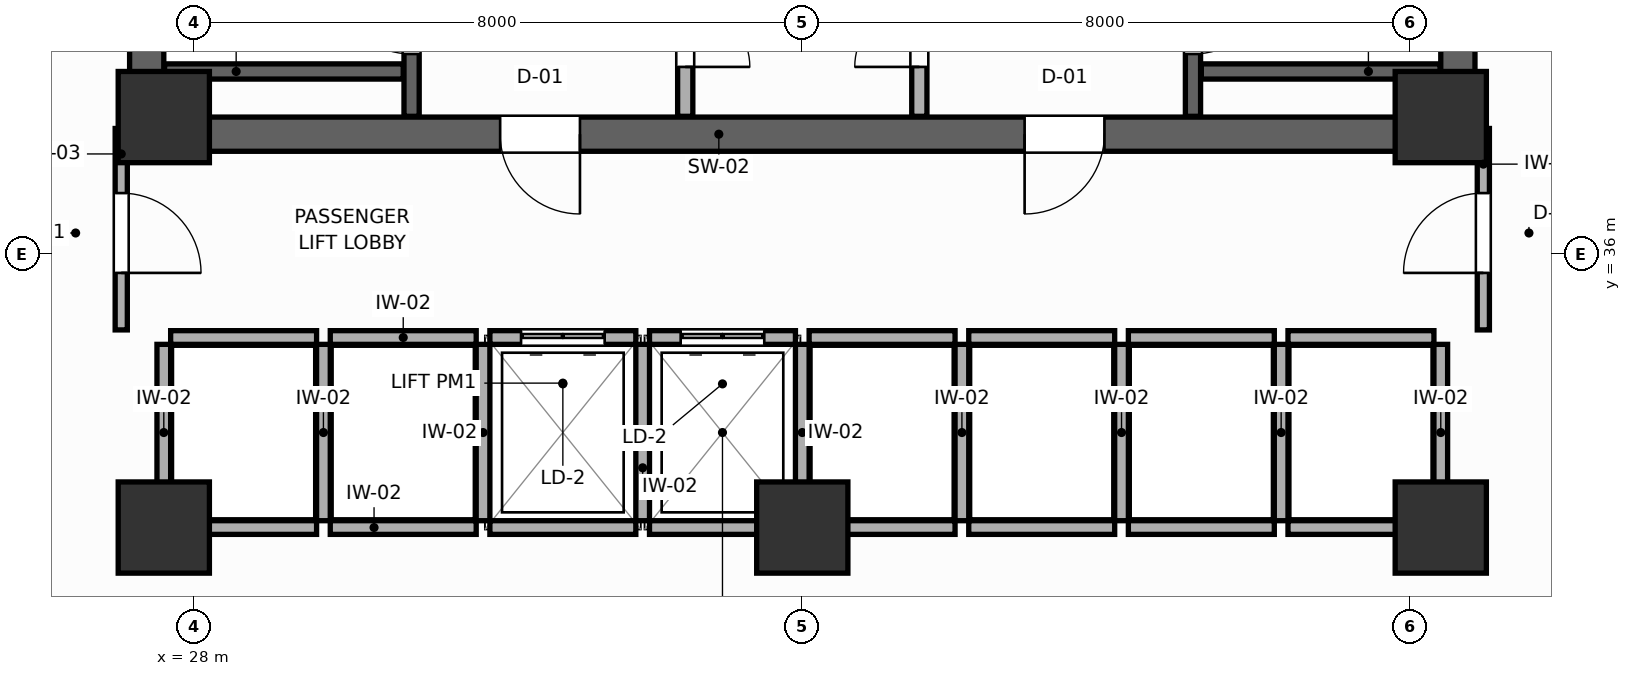
"""IFC4 building model, lengths in metres.
Left out: names, types, materials, properties, quantities, classifications, styles, units other than length and angle.
Written with IfcOpenShell. Run it as: python <this file> out.ifc"""

import sys

from ifc_helpers import new_model, si_unit, direction, frame, frame_2d, origin, origin_2d, place, context, subcontext, project, spatial, rectangle, extrude, source, transform, mapped, element, fill, save


model = new_model("IFC4")
c1 = context("Model", 3, precision=1e-05, world=origin(), true_north=direction((0.0, 1.0)))
c2 = subcontext(c1, "Body", "Model", "MODEL_VIEW")
j1 = project(units=[si_unit("LENGTHUNIT", "METRE"), si_unit("PLANEANGLEUNIT", "RADIAN")], contexts=[c1])
p1 = place(None, origin())
s1 = spatial("IfcSite", under=j1, at=p1, CompositionType="ELEMENT")
p2 = place(p1, origin())
s2 = spatial("IfcBuilding", under=s1, at=p2, CompositionType="ELEMENT")
p3 = place(p2, frame((0.0, 0.0, 102.6)))
s3 = spatial("IfcBuildingStorey", under=s2, at=p3, CompositionType="ELEMENT", Elevation=102.6)
p4 = place(p3, frame((27.15, 37.575, 0.0), z_axis=(0.0, 0.0, 1.0), x_axis=(1.0, 0.0, 0.0)))
e1 = element("IfcWall", 1, at=p4, inside=s3, PredefinedType="SHEAR", context=c2, shape_type="SweptSolid", body=[
    extrude(rectangle(XDim=17.7, YDim=0.45, at=frame_2d((8.85, 0.0))), origin(), (0.0, 0.0, 1.0), 3.6),
])
p5 = place(p4, frame((4.875, 0.0, 0.0)))
e2 = element("IfcOpeningElement", 2, at=p5, cuts=e1, PredefinedType="OPENING", context=c2, shape_type="SweptSolid", body=[
    extrude(rectangle(XDim=1.05, YDim=2.1, at=frame_2d((0.525, 1.05))), frame((0.0, 0.235, 0.0), z_axis=(0.0, -1.0, 0.0), x_axis=(1.0, 0.0, 0.0)), (0.0, 0.0, 1.0), 0.47),
])
p6 = place(p4, frame((11.775, 0.0, 0.0)))
e3 = element("IfcOpeningElement", 3, at=p6, cuts=e1, PredefinedType="OPENING", context=c2, shape_type="SweptSolid", body=[
    extrude(rectangle(XDim=1.05, YDim=2.1, at=frame_2d((0.525, 1.05))), frame((0.0, 0.235, 0.0), z_axis=(0.0, -1.0, 0.0), x_axis=(1.0, 0.0, 0.0)), (0.0, 0.0, 1.0), 0.47),
])
for number, where, z_axis, x_axis in (
    (4, (27.375, 37.8, 0.0), (0.0, 0.0, 1.0), (0.0, 1.0, 0.0)),
    (5, (44.625, 37.8, 0.0), (0.0, 0.0, 1.0), (0.0, 1.0, 0.0)),
):
    element("IfcWall", number, at=place(p3, frame(where, z_axis=z_axis, x_axis=x_axis)), inside=s3, PredefinedType="SHEAR", context=c2, shape_type="SweptSolid", body=[
        extrude(rectangle(XDim=9.0, YDim=0.45, at=frame_2d((4.5, 0.0))), origin(), (0.0, 0.0, 1.0), 3.6),
    ])
m1 = source(origin(), c2, "Body", "SweptSolid", [
    extrude(rectangle(XDim=1.2, YDim=1.2, at=origin_2d()), origin(), (0.0, 0.0, 1.0), 3.6),
])
for number, where, z_axis, x_axis in (
    (6, (27.6, 37.8, 0.0), (0.0, 0.0, 1.0), (1.0, 0.0, 0.0)),
    (7, (44.4, 37.8, 0.0), (0.0, 0.0, 1.0), (1.0, 0.0, 0.0)),
    (8, (27.6, 32.4, 0.0), (0.0, 0.0, 1.0), (1.0, 0.0, 0.0)),
    (9, (44.4, 32.4, 0.0), (0.0, 0.0, 1.0), (1.0, 0.0, 0.0)),
    (10, (36.0, 32.4, 0.0), (0.0, 0.0, 1.0), (1.0, 0.0, 0.0)),
):
    element("IfcColumn", number, at=place(p3, frame(where, z_axis=z_axis, x_axis=x_axis)), inside=s3, PredefinedType="COLUMN", context=c2, shape_type="MappedRepresentation", body=[
        mapped(m1, transform((0.0, 0.0, 0.0), scale=1.0)),
    ])
p7 = place(p3, frame((30.86, 37.81, 0.0), z_axis=(0.0, 0.0, 1.0), x_axis=(0.0, 1.0, 0.0)))
e11 = element("IfcWall", 11, at=p7, inside=s3, PredefinedType="SHEAR", context=c2, shape_type="SweptSolid", body=[
    extrude(rectangle(XDim=8.98, YDim=0.2, at=frame_2d((4.49, 0.0))), origin(), (0.0, 0.0, 1.0), 3.6),
])
p8 = place(p7, frame((0.82, 0.0, 0.0)))
e12 = element("IfcOpeningElement", 12, at=p8, cuts=e11, PredefinedType="OPENING", context=c2, shape_type="SweptSolid", body=[
    extrude(rectangle(XDim=1.05, YDim=2.1, at=frame_2d((0.525, 1.05))), frame((0.0, 0.11, 0.0), z_axis=(0.0, -1.0, 0.0), x_axis=(1.0, 0.0, 0.0)), (0.0, 0.0, 1.0), 0.22),
])
p9 = place(p3, frame((27.61, 38.4, 0.0), z_axis=(0.0, 0.0, 1.0), x_axis=(1.0, 0.0, 0.0)))
e13 = element("IfcWall", 13, at=p9, inside=s3, PredefinedType="SHEAR", context=c2, shape_type="SweptSolid", body=[
    extrude(rectangle(XDim=3.14, YDim=0.2, at=frame_2d((1.57, 0.0))), origin(), (0.0, 0.0, 1.0), 3.6),
])
p10 = place(p3, frame((41.14, 37.81, 0.0), z_axis=(0.0, 0.0, 1.0), x_axis=(0.0, 1.0, 0.0)))
e14 = element("IfcWall", 14, at=p10, inside=s3, PredefinedType="SHEAR", context=c2, shape_type="SweptSolid", body=[
    extrude(rectangle(XDim=8.98, YDim=0.2, at=frame_2d((4.49, 0.0))), origin(), (0.0, 0.0, 1.0), 3.6),
])
p11 = place(p10, frame((0.82, 0.0, 0.0)))
e15 = element("IfcOpeningElement", 15, at=p11, cuts=e14, PredefinedType="OPENING", context=c2, shape_type="SweptSolid", body=[
    extrude(rectangle(XDim=1.05, YDim=2.1, at=frame_2d((0.525, 1.05))), frame((0.0, 0.11, 0.0), z_axis=(0.0, -1.0, 0.0), x_axis=(1.0, 0.0, 0.0)), (0.0, 0.0, 1.0), 0.22),
])
p12 = place(p3, frame((41.25, 38.4, 0.0), z_axis=(0.0, 0.0, 1.0), x_axis=(1.0, 0.0, 0.0)))
e16 = element("IfcWall", 16, at=p12, inside=s3, PredefinedType="SHEAR", context=c2, shape_type="SweptSolid", body=[
    extrude(rectangle(XDim=3.14, YDim=0.2, at=frame_2d((1.57, 0.0))), origin(), (0.0, 0.0, 1.0), 3.6),
])
p13 = place(p3, frame((34.46, 37.81, 0.0), z_axis=(0.0, 0.0, 1.0), x_axis=(0.0, 1.0, 0.0)))
e17 = element("IfcWall", 17, at=p13, inside=s3, PredefinedType="PARTITIONING", context=c2, shape_type="SweptSolid", body=[
    extrude(rectangle(XDim=8.98, YDim=0.2, at=frame_2d((4.49, 0.0))), origin(), (0.0, 0.0, 1.0), 3.4),
])
p14 = place(p13, frame((0.65, 0.0, 0.0)))
e18 = element("IfcOpeningElement", 18, at=p14, cuts=e17, PredefinedType="OPENING", context=c2, shape_type="SweptSolid", body=[
    extrude(rectangle(XDim=0.85, YDim=2.05, at=frame_2d((0.425, 1.025))), frame((0.0, 0.11, 0.0), z_axis=(0.0, -1.0, 0.0), x_axis=(1.0, 0.0, 0.0)), (0.0, 0.0, 1.0), 0.22),
])
p15 = place(p3, frame((37.54, 37.81, 0.0), z_axis=(0.0, 0.0, 1.0), x_axis=(0.0, 1.0, 0.0)))
e19 = element("IfcWall", 19, at=p15, inside=s3, PredefinedType="PARTITIONING", context=c2, shape_type="SweptSolid", body=[
    extrude(rectangle(XDim=8.98, YDim=0.2, at=frame_2d((4.49, 0.0))), origin(), (0.0, 0.0, 1.0), 3.4),
])
p16 = place(p15, frame((0.65, 0.0, 0.0)))
e20 = element("IfcOpeningElement", 20, at=p16, cuts=e19, PredefinedType="OPENING", context=c2, shape_type="SweptSolid", body=[
    extrude(rectangle(XDim=0.85, YDim=2.05, at=frame_2d((0.425, 1.025))), frame((0.0, 0.11, 0.0), z_axis=(0.0, -1.0, 0.0), x_axis=(1.0, 0.0, 0.0)), (0.0, 0.0, 1.0), 0.22),
])
p17 = place(p3, frame((27.69, 34.9, 0.0), z_axis=(0.0, 0.0, 1.0), x_axis=(1.0, 0.0, 0.0)))
e21 = element("IfcWall", 21, at=p17, inside=s3, PredefinedType="PARTITIONING", context=c2, shape_type="SweptSolid", body=[
    extrude(rectangle(XDim=1.92, YDim=0.18, at=frame_2d((0.96, 0.0))), origin(), (0.0, 0.0, 1.0), 3.4),
])
p18 = place(p3, frame((27.69, 32.4, 0.0), z_axis=(0.0, 0.0, 1.0), x_axis=(1.0, 0.0, 0.0)))
e22 = element("IfcWall", 22, at=p18, inside=s3, PredefinedType="PARTITIONING", context=c2, shape_type="SweptSolid", body=[
    extrude(rectangle(XDim=1.92, YDim=0.18, at=frame_2d((0.96, 0.0))), origin(), (0.0, 0.0, 1.0), 2.95),
])
p19 = place(p3, frame((27.6, 32.49, 0.0), z_axis=(0.0, 0.0, 1.0), x_axis=(0.0, 1.0, 0.0)))
e23 = element("IfcWall", 23, at=p19, inside=s3, PredefinedType="PARTITIONING", context=c2, shape_type="SweptSolid", body=[
    extrude(rectangle(XDim=2.32, YDim=0.18, at=frame_2d((1.16, 0.0))), origin(), (0.0, 0.0, 1.0), 3.4),
])
p20 = place(p3, frame((29.79, 34.9, 0.0), z_axis=(0.0, 0.0, 1.0), x_axis=(1.0, 0.0, 0.0)))
e24 = element("IfcWall", 24, at=p20, inside=s3, PredefinedType="PARTITIONING", context=c2, shape_type="SweptSolid", body=[
    extrude(rectangle(XDim=1.92, YDim=0.18, at=frame_2d((0.96, 0.0))), origin(), (0.0, 0.0, 1.0), 3.4),
])
p21 = place(p3, frame((29.79, 32.4, 0.0), z_axis=(0.0, 0.0, 1.0), x_axis=(1.0, 0.0, 0.0)))
e25 = element("IfcWall", 25, at=p21, inside=s3, PredefinedType="PARTITIONING", context=c2, shape_type="SweptSolid", body=[
    extrude(rectangle(XDim=1.92, YDim=0.18, at=frame_2d((0.96, 0.0))), origin(), (0.0, 0.0, 1.0), 2.95),
])
p22 = place(p3, frame((29.7, 32.49, 0.0), z_axis=(0.0, 0.0, 1.0), x_axis=(0.0, 1.0, 0.0)))
e26 = element("IfcWall", 26, at=p22, inside=s3, PredefinedType="PARTITIONING", context=c2, shape_type="SweptSolid", body=[
    extrude(rectangle(XDim=2.32, YDim=0.18, at=frame_2d((1.16, 0.0))), origin(), (0.0, 0.0, 1.0), 3.4),
])
p23 = place(p3, frame((31.89, 34.9, 0.0), z_axis=(0.0, 0.0, 1.0), x_axis=(1.0, 0.0, 0.0)))
e27 = element("IfcWall", 27, at=p23, inside=s3, PredefinedType="PARTITIONING", context=c2, shape_type="SweptSolid", body=[
    extrude(rectangle(XDim=1.92, YDim=0.18, at=frame_2d((0.96, 0.0))), origin(), (0.0, 0.0, 1.0), 3.4),
])
p24 = place(p23, frame((0.41, 0.0, 0.0)))
e28 = element("IfcOpeningElement", 28, at=p24, cuts=e27, PredefinedType="OPENING", context=c2, shape_type="SweptSolid", body=[
    extrude(rectangle(XDim=1.1, YDim=2.1, at=frame_2d((0.55, 1.05))), frame((0.0, 0.1, 0.0), z_axis=(0.0, -1.0, 0.0), x_axis=(1.0, 0.0, 0.0)), (0.0, 0.0, 1.0), 0.2),
])
p25 = place(p3, frame((31.89, 32.4, 0.0), z_axis=(0.0, 0.0, 1.0), x_axis=(1.0, 0.0, 0.0)))
e29 = element("IfcWall", 29, at=p25, inside=s3, PredefinedType="PARTITIONING", context=c2, shape_type="SweptSolid", body=[
    extrude(rectangle(XDim=1.92, YDim=0.18, at=frame_2d((0.96, 0.0))), origin(), (0.0, 0.0, 1.0), 2.95),
])
p26 = place(p3, frame((31.8, 32.49, 0.0), z_axis=(0.0, 0.0, 1.0), x_axis=(0.0, 1.0, 0.0)))
e30 = element("IfcWall", 30, at=p26, inside=s3, PredefinedType="PARTITIONING", context=c2, shape_type="SweptSolid", body=[
    extrude(rectangle(XDim=2.32, YDim=0.18, at=frame_2d((1.16, 0.0))), origin(), (0.0, 0.0, 1.0), 3.4),
])
p27 = place(p3, frame((33.99, 34.9, 0.0), z_axis=(0.0, 0.0, 1.0), x_axis=(1.0, 0.0, 0.0)))
e31 = element("IfcWall", 31, at=p27, inside=s3, PredefinedType="PARTITIONING", context=c2, shape_type="SweptSolid", body=[
    extrude(rectangle(XDim=1.92, YDim=0.18, at=frame_2d((0.96, 0.0))), origin(), (0.0, 0.0, 1.0), 3.4),
])
p28 = place(p27, frame((0.41, 0.0, 0.0)))
e32 = element("IfcOpeningElement", 32, at=p28, cuts=e31, PredefinedType="OPENING", context=c2, shape_type="SweptSolid", body=[
    extrude(rectangle(XDim=1.1, YDim=2.1, at=frame_2d((0.55, 1.05))), frame((0.0, 0.1, 0.0), z_axis=(0.0, -1.0, 0.0), x_axis=(1.0, 0.0, 0.0)), (0.0, 0.0, 1.0), 0.2),
])
p29 = place(p3, frame((33.99, 32.4, 0.0), z_axis=(0.0, 0.0, 1.0), x_axis=(1.0, 0.0, 0.0)))
e33 = element("IfcWall", 33, at=p29, inside=s3, PredefinedType="PARTITIONING", context=c2, shape_type="SweptSolid", body=[
    extrude(rectangle(XDim=1.92, YDim=0.18, at=frame_2d((0.96, 0.0))), origin(), (0.0, 0.0, 1.0), 2.95),
])
p30 = place(p3, frame((33.9, 32.49, 0.0), z_axis=(0.0, 0.0, 1.0), x_axis=(0.0, 1.0, 0.0)))
e34 = element("IfcWall", 34, at=p30, inside=s3, PredefinedType="PARTITIONING", context=c2, shape_type="SweptSolid", body=[
    extrude(rectangle(XDim=2.32, YDim=0.18, at=frame_2d((1.16, 0.0))), origin(), (0.0, 0.0, 1.0), 3.4),
])
p31 = place(p3, frame((36.09, 34.9, 0.0), z_axis=(0.0, 0.0, 1.0), x_axis=(1.0, 0.0, 0.0)))
e35 = element("IfcWall", 35, at=p31, inside=s3, PredefinedType="PARTITIONING", context=c2, shape_type="SweptSolid", body=[
    extrude(rectangle(XDim=1.92, YDim=0.18, at=frame_2d((0.96, 0.0))), origin(), (0.0, 0.0, 1.0), 3.4),
])
p32 = place(p3, frame((36.09, 32.4, 0.0), z_axis=(0.0, 0.0, 1.0), x_axis=(1.0, 0.0, 0.0)))
e36 = element("IfcWall", 36, at=p32, inside=s3, PredefinedType="PARTITIONING", context=c2, shape_type="SweptSolid", body=[
    extrude(rectangle(XDim=1.92, YDim=0.18, at=frame_2d((0.96, 0.0))), origin(), (0.0, 0.0, 1.0), 2.95),
])
p33 = place(p3, frame((36.0, 32.49, 0.0), z_axis=(0.0, 0.0, 1.0), x_axis=(0.0, 1.0, 0.0)))
e37 = element("IfcWall", 37, at=p33, inside=s3, PredefinedType="PARTITIONING", context=c2, shape_type="SweptSolid", body=[
    extrude(rectangle(XDim=2.32, YDim=0.18, at=frame_2d((1.16, 0.0))), origin(), (0.0, 0.0, 1.0), 3.4),
])
p34 = place(p3, frame((38.19, 34.9, 0.0), z_axis=(0.0, 0.0, 1.0), x_axis=(1.0, 0.0, 0.0)))
e38 = element("IfcWall", 38, at=p34, inside=s3, PredefinedType="PARTITIONING", context=c2, shape_type="SweptSolid", body=[
    extrude(rectangle(XDim=1.92, YDim=0.18, at=frame_2d((0.96, 0.0))), origin(), (0.0, 0.0, 1.0), 3.4),
])
p35 = place(p3, frame((38.19, 32.4, 0.0), z_axis=(0.0, 0.0, 1.0), x_axis=(1.0, 0.0, 0.0)))
e39 = element("IfcWall", 39, at=p35, inside=s3, PredefinedType="PARTITIONING", context=c2, shape_type="SweptSolid", body=[
    extrude(rectangle(XDim=1.92, YDim=0.18, at=frame_2d((0.96, 0.0))), origin(), (0.0, 0.0, 1.0), 2.95),
])
p36 = place(p3, frame((38.1, 32.49, 0.0), z_axis=(0.0, 0.0, 1.0), x_axis=(0.0, 1.0, 0.0)))
e40 = element("IfcWall", 40, at=p36, inside=s3, PredefinedType="PARTITIONING", context=c2, shape_type="SweptSolid", body=[
    extrude(rectangle(XDim=2.32, YDim=0.18, at=frame_2d((1.16, 0.0))), origin(), (0.0, 0.0, 1.0), 3.4),
])
p37 = place(p3, frame((40.29, 34.9, 0.0), z_axis=(0.0, 0.0, 1.0), x_axis=(1.0, 0.0, 0.0)))
e41 = element("IfcWall", 41, at=p37, inside=s3, PredefinedType="PARTITIONING", context=c2, shape_type="SweptSolid", body=[
    extrude(rectangle(XDim=1.92, YDim=0.18, at=frame_2d((0.96, 0.0))), origin(), (0.0, 0.0, 1.0), 3.4),
])
p38 = place(p3, frame((40.29, 32.4, 0.0), z_axis=(0.0, 0.0, 1.0), x_axis=(1.0, 0.0, 0.0)))
e42 = element("IfcWall", 42, at=p38, inside=s3, PredefinedType="PARTITIONING", context=c2, shape_type="SweptSolid", body=[
    extrude(rectangle(XDim=1.92, YDim=0.18, at=frame_2d((0.96, 0.0))), origin(), (0.0, 0.0, 1.0), 2.95),
])
p39 = place(p3, frame((40.2, 32.49, 0.0), z_axis=(0.0, 0.0, 1.0), x_axis=(0.0, 1.0, 0.0)))
e43 = element("IfcWall", 43, at=p39, inside=s3, PredefinedType="PARTITIONING", context=c2, shape_type="SweptSolid", body=[
    extrude(rectangle(XDim=2.32, YDim=0.18, at=frame_2d((1.16, 0.0))), origin(), (0.0, 0.0, 1.0), 3.4),
])
p40 = place(p3, frame((42.39, 34.9, 0.0), z_axis=(0.0, 0.0, 1.0), x_axis=(1.0, 0.0, 0.0)))
e44 = element("IfcWall", 44, at=p40, inside=s3, PredefinedType="PARTITIONING", context=c2, shape_type="SweptSolid", body=[
    extrude(rectangle(XDim=1.92, YDim=0.18, at=frame_2d((0.96, 0.0))), origin(), (0.0, 0.0, 1.0), 3.4),
])
p41 = place(p3, frame((42.39, 32.4, 0.0), z_axis=(0.0, 0.0, 1.0), x_axis=(1.0, 0.0, 0.0)))
e45 = element("IfcWall", 45, at=p41, inside=s3, PredefinedType="PARTITIONING", context=c2, shape_type="SweptSolid", body=[
    extrude(rectangle(XDim=1.92, YDim=0.18, at=frame_2d((0.96, 0.0))), origin(), (0.0, 0.0, 1.0), 2.95),
])
for number, where, z_axis, x_axis in (
    (46, (42.3, 32.49, 0.0), (0.0, 0.0, 1.0), (0.0, 1.0, 0.0)),
    (47, (44.4, 32.49, 0.0), (0.0, 0.0, 1.0), (0.0, 1.0, 0.0)),
):
    element("IfcWall", number, at=place(p3, frame(where, z_axis=z_axis, x_axis=x_axis)), inside=s3, PredefinedType="PARTITIONING", context=c2, shape_type="SweptSolid", body=[
        extrude(rectangle(XDim=2.32, YDim=0.18, at=frame_2d((1.16, 0.0))), origin(), (0.0, 0.0, 1.0), 3.4),
    ])
p42 = place(p3, frame((27.04, 35.0, 0.0), z_axis=(0.0, 0.0, 1.0), x_axis=(0.0, 1.0, 0.0)))
e48 = element("IfcWall", 48, at=p42, inside=s3, PredefinedType="PARTITIONING", context=c2, shape_type="SweptSolid", body=[
    extrude(rectangle(XDim=2.65, YDim=0.16, at=frame_2d((1.325, 0.0))), origin(), (0.0, 0.0, 1.0), 3.4),
])
p43 = place(p42, frame((0.75, 0.0, 0.0)))
e49 = element("IfcOpeningElement", 49, at=p43, cuts=e48, PredefinedType="OPENING", context=c2, shape_type="SweptSolid", body=[
    extrude(rectangle(XDim=1.05, YDim=2.1, at=frame_2d((0.525, 1.05))), frame((0.0, 0.09, 0.0), z_axis=(0.0, -1.0, 0.0), x_axis=(1.0, 0.0, 0.0)), (0.0, 0.0, 1.0), 0.18),
])
p44 = place(p3, frame((44.96, 35.0, 0.0), z_axis=(0.0, 0.0, 1.0), x_axis=(0.0, 1.0, 0.0)))
e50 = element("IfcWall", 50, at=p44, inside=s3, PredefinedType="PARTITIONING", context=c2, shape_type="SweptSolid", body=[
    extrude(rectangle(XDim=2.65, YDim=0.16, at=frame_2d((1.325, 0.0))), origin(), (0.0, 0.0, 1.0), 3.4),
])
p45 = place(p44, frame((0.75, 0.0, 0.0)))
e51 = element("IfcOpeningElement", 51, at=p45, cuts=e50, PredefinedType="OPENING", context=c2, shape_type="SweptSolid", body=[
    extrude(rectangle(XDim=1.05, YDim=2.1, at=frame_2d((0.525, 1.05))), frame((0.0, 0.09, 0.0), z_axis=(0.0, -1.0, 0.0), x_axis=(1.0, 0.0, 0.0)), (0.0, 0.0, 1.0), 0.18),
])
p46 = place(p8, origin())
e52 = element("IfcDoor", 52, at=p46, inside=s3, OperationType="SINGLE_SWING_RIGHT", PredefinedType="DOOR", context=c2, shape_type="SweptSolid", body=[
    extrude(rectangle(XDim=1.05, YDim=2.1, at=frame_2d((0.525, 1.05))), frame((0.0, 0.025, 0.0), z_axis=(0.0, -1.0, 0.0), x_axis=(1.0, 0.0, 0.0)), (0.0, 0.0, 1.0), 0.05),
])
fill(e12, e52)
p47 = place(p11, frame((1.05, 0.0, 0.0), z_axis=(0.0, 0.0, 1.0), x_axis=(-1.0, 0.0, 0.0)))
e53 = element("IfcDoor", 53, at=p47, inside=s3, OperationType="SINGLE_SWING_LEFT", PredefinedType="DOOR", context=c2, shape_type="SweptSolid", body=[
    extrude(rectangle(XDim=1.05, YDim=2.1, at=frame_2d((0.525, 1.05))), frame((0.0, 0.025, 0.0), z_axis=(0.0, -1.0, 0.0), x_axis=(1.0, 0.0, 0.0)), (0.0, 0.0, 1.0), 0.05),
])
fill(e15, e53)
p48 = place(p14, frame((0.85, 0.0, 0.0), z_axis=(0.0, 0.0, 1.0), x_axis=(-1.0, 0.0, 0.0)))
e54 = element("IfcDoor", 54, at=p48, inside=s3, OperationType="SINGLE_SWING_RIGHT", PredefinedType="DOOR", context=c2, shape_type="SweptSolid", body=[
    extrude(rectangle(XDim=0.85, YDim=2.05, at=frame_2d((0.425, 1.025))), frame((0.0, 0.025, 0.0), z_axis=(0.0, -1.0, 0.0), x_axis=(1.0, 0.0, 0.0)), (0.0, 0.0, 1.0), 0.05),
])
fill(e18, e54)
p49 = place(p16, origin())
e55 = element("IfcDoor", 55, at=p49, inside=s3, OperationType="SINGLE_SWING_LEFT", PredefinedType="DOOR", context=c2, shape_type="SweptSolid", body=[
    extrude(rectangle(XDim=0.85, YDim=2.05, at=frame_2d((0.425, 1.025))), frame((0.0, 0.025, 0.0), z_axis=(0.0, -1.0, 0.0), x_axis=(1.0, 0.0, 0.0)), (0.0, 0.0, 1.0), 0.05),
])
fill(e20, e55)
p50 = place(p24, origin())
e56 = element("IfcDoor", 56, at=p50, inside=s3, OperationType="DOUBLE_DOOR_SLIDING", PredefinedType="DOOR", context=c2, shape_type="SweptSolid", body=[
    extrude(rectangle(XDim=1.1, YDim=2.1, at=frame_2d((0.55, 1.05))), frame((0.0, 0.025, 0.0), z_axis=(0.0, -1.0, 0.0), x_axis=(1.0, 0.0, 0.0)), (0.0, 0.0, 1.0), 0.05),
])
fill(e28, e56)
p51 = place(p28, origin())
e57 = element("IfcDoor", 57, at=p51, inside=s3, OperationType="DOUBLE_DOOR_SLIDING", PredefinedType="DOOR", context=c2, shape_type="SweptSolid", body=[
    extrude(rectangle(XDim=1.1, YDim=2.1, at=frame_2d((0.55, 1.05))), frame((0.0, 0.025, 0.0), z_axis=(0.0, -1.0, 0.0), x_axis=(1.0, 0.0, 0.0)), (0.0, 0.0, 1.0), 0.05),
])
fill(e32, e57)
p52 = place(p43, frame((1.05, 0.0, 0.0), z_axis=(0.0, 0.0, 1.0), x_axis=(-1.0, 0.0, 0.0)))
e58 = element("IfcDoor", 58, at=p52, inside=s3, OperationType="SINGLE_SWING_RIGHT", PredefinedType="DOOR", context=c2, shape_type="SweptSolid", body=[
    extrude(rectangle(XDim=1.05, YDim=2.1, at=frame_2d((0.525, 1.05))), frame((0.0, 0.025, 0.0), z_axis=(0.0, -1.0, 0.0), x_axis=(1.0, 0.0, 0.0)), (0.0, 0.0, 1.0), 0.05),
])
fill(e49, e58)
p53 = place(p45, origin())
e59 = element("IfcDoor", 59, at=p53, inside=s3, OperationType="SINGLE_SWING_LEFT", PredefinedType="DOOR", context=c2, shape_type="SweptSolid", body=[
    extrude(rectangle(XDim=1.05, YDim=2.1, at=frame_2d((0.525, 1.05))), frame((0.0, 0.025, 0.0), z_axis=(0.0, -1.0, 0.0), x_axis=(1.0, 0.0, 0.0)), (0.0, 0.0, 1.0), 0.05),
])
fill(e51, e59)
p54 = place(p5, frame((1.05, 0.0, 0.0), z_axis=(0.0, 0.0, 1.0), x_axis=(-1.0, 0.0, 0.0)))
e60 = element("IfcDoor", 60, at=p54, inside=s3, OperationType="SINGLE_SWING_LEFT", PredefinedType="DOOR", context=c2, shape_type="SweptSolid", body=[
    extrude(rectangle(XDim=1.05, YDim=2.1, at=frame_2d((0.525, 1.05))), frame((0.0, 0.025, 0.0), z_axis=(0.0, -1.0, 0.0), x_axis=(1.0, 0.0, 0.0)), (0.0, 0.0, 1.0), 0.05),
])
fill(e2, e60)
p55 = place(p6, frame((1.05, 0.0, 0.0), z_axis=(0.0, 0.0, 1.0), x_axis=(-1.0, 0.0, 0.0)))
e61 = element("IfcDoor", 61, at=p55, inside=s3, OperationType="SINGLE_SWING_RIGHT", PredefinedType="DOOR", context=c2, shape_type="SweptSolid", body=[
    extrude(rectangle(XDim=1.05, YDim=2.1, at=frame_2d((0.525, 1.05))), frame((0.0, 0.025, 0.0), z_axis=(0.0, -1.0, 0.0), x_axis=(1.0, 0.0, 0.0)), (0.0, 0.0, 1.0), 0.05),
])
fill(e3, e61)
save(model, sys.argv[1])
